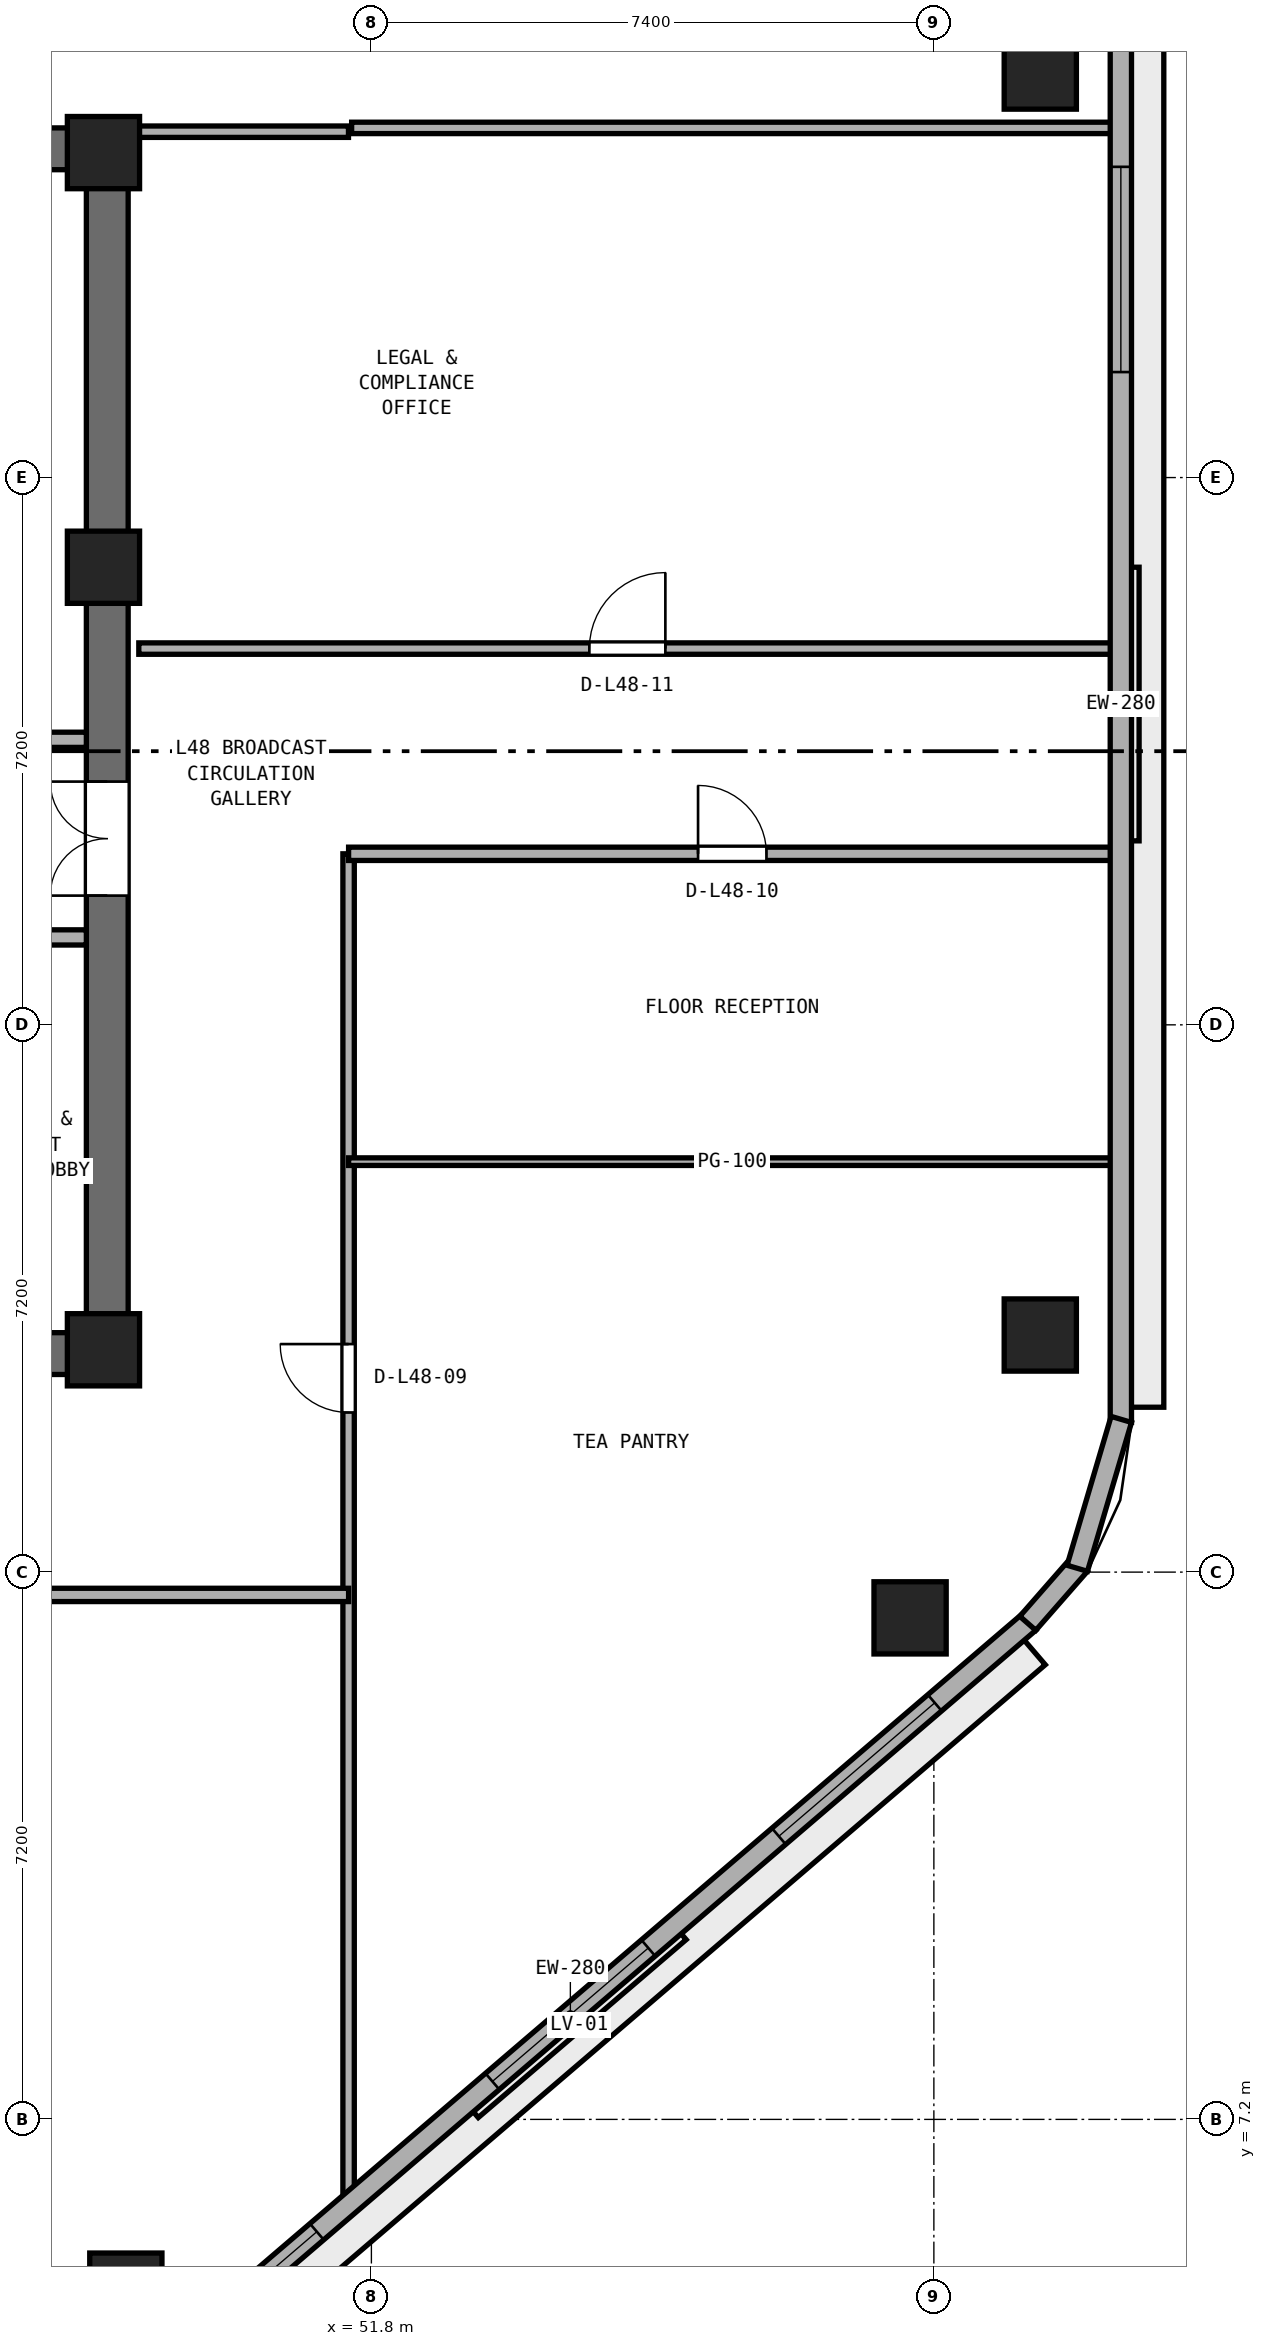
"""IFC4 building model, lengths in metres.
Left out: names, types, materials, properties, quantities, classifications, styles, units other than length and angle.
Written with IfcOpenShell. Run it as: python <this file> out.ifc"""

import sys

from ifc_helpers import new_model, si_unit, direction, frame, frame_2d, origin, origin_2d, place, context, subcontext, project, spatial, rectangle, extrude, element, fill, save


model = new_model("IFC4")
c1 = context("Model", 3, precision=1e-05, world=origin(), true_north=direction((0.0, 1.0)))
c2 = subcontext(c1, "Body", "Model", "MODEL_VIEW")
j1 = project(units=[si_unit("LENGTHUNIT", "METRE"), si_unit("PLANEANGLEUNIT", "RADIAN")], contexts=[c1])
p1 = place(None, origin())
s1 = spatial("IfcSite", under=j1, at=p1, CompositionType="ELEMENT")
p2 = place(p1, origin())
s2 = spatial("IfcBuilding", under=s1, at=p2, CompositionType="ELEMENT")
p3 = place(p2, frame((0.0, 0.0, 189.6)))
s3 = spatial("IfcBuildingStorey", under=s2, at=p3, CompositionType="ELEMENT", Elevation=189.6)
for number, where, z_axis, x_axis in (
    (1, (25.4, 17.275, 0.0), (0.0, 0.0, 1.0), (1.0, 0.0, 0.0)),
    (2, (25.4, 33.125, 0.0), (0.0, 0.0, 1.0), (1.0, 0.0, 0.0)),
):
    element("IfcWall", number, at=place(p3, frame(where, z_axis=z_axis, x_axis=x_axis)), inside=s3, PredefinedType="SHEAR", context=c2, shape_type="SweptSolid", body=[
        extrude(rectangle(XDim=23.2, YDim=0.55, at=frame_2d((11.6, 0.0))), origin(), (0.0, 0.0, 1.0), 3.54),
    ])
p4 = place(p3, frame((48.325, 17.55, 0.0), z_axis=(0.0, 0.0, 1.0), x_axis=(0.0, 1.0, 0.0)))
e3 = element("IfcWall", 3, at=p4, inside=s3, PredefinedType="SHEAR", context=c2, shape_type="SweptSolid", body=[
    extrude(rectangle(XDim=15.3, YDim=0.55, at=frame_2d((7.65, 0.0))), origin(), (0.0, 0.0, 1.0), 3.54),
])
p5 = place(p4, frame((5.75, 0.0, 0.0)))
e4 = element("IfcOpeningElement", 4, at=p5, cuts=e3, PredefinedType="OPENING", context=c2, shape_type="SweptSolid", body=[
    extrude(rectangle(XDim=1.5, YDim=2.15, at=frame_2d((0.75, 1.075))), frame((0.0, 0.285, 0.0), z_axis=(0.0, -1.0, 0.0), x_axis=(1.0, 0.0, 0.0)), (0.0, 0.0, 1.0), 0.57),
])
for number, where, z_axis, x_axis in (
    (5, (48.275, 17.325, 0.0), (0.0, 0.0, 1.0), (1.0, 0.0, 0.0)),
    (6, (48.275, 27.62, 0.0), (0.0, 0.0, 1.0), (1.0, 0.0, 0.0)),
    (7, (48.275, 33.075, 0.0), (0.0, 0.0, 1.0), (1.0, 0.0, 0.0)),
):
    element("IfcColumn", number, at=place(p3, frame(where, z_axis=z_axis, x_axis=x_axis)), inside=s3, PredefinedType="PILASTER", context=c2, shape_type="SweptSolid", body=[
        extrude(rectangle(XDim=0.95, YDim=0.95, at=origin_2d()), origin(), (0.0, 0.0, 1.0), 3.8),
    ])
for number, where, z_axis, x_axis in (
    (8, (48.57, 4.967, 0.0), (0.0, 0.0, 1.0), (1.0, 0.0, 0.0)),
    (9, (58.887, 13.798, 0.0), (0.0, 0.0, 1.0), (1.0, 0.0, 0.0)),
    (10, (60.6, 17.519, 0.0), (0.0, 0.0, 1.0), (1.0, 0.0, 0.0)),
    (11, (60.6, 34.122, 0.0), (0.0, 0.0, 1.0), (1.0, 0.0, 0.0)),
):
    element("IfcColumn", number, at=place(p3, frame(where, z_axis=z_axis, x_axis=x_axis)), inside=s3, PredefinedType="COLUMN", context=c2, shape_type="SweptSolid", body=[
        extrude(rectangle(XDim=0.95, YDim=0.95, at=origin_2d()), origin(), (0.0, 0.0, 1.0), 3.8),
    ])
p6 = place(p3, frame((42.0, 22.75, 0.0), z_axis=(0.0, 0.0, 1.0), x_axis=(1.0, 0.0, 0.0)))
e12 = element("IfcWall", 12, at=p6, inside=s3, PredefinedType="SOLIDWALL", context=c2, shape_type="SweptSolid", body=[
    extrude(rectangle(XDim=6.05, YDim=0.2, at=frame_2d((3.025, 0.0))), origin(), (0.0, 0.0, 1.0), 3.54),
])
p7 = place(p3, frame((46.1, 25.35, 0.0), z_axis=(0.0, 0.0, 1.0), x_axis=(1.0, 0.0, 0.0)))
e13 = element("IfcWall", 13, at=p7, inside=s3, PredefinedType="SOLIDWALL", context=c2, shape_type="SweptSolid", body=[
    extrude(rectangle(XDim=1.95, YDim=0.2, at=frame_2d((0.975, 0.0))), origin(), (0.0, 0.0, 1.0), 3.54),
])
p8 = place(p3, frame((51.5, 6.036, 0.0), z_axis=(0.0, 0.0, 1.0), x_axis=(0.0, 1.0, 0.0)))
e14 = element("IfcWall", 14, at=p8, inside=s3, PredefinedType="PARTITIONING", context=c2, shape_type="SweptSolid", body=[
    extrude(rectangle(XDim=17.814, YDim=0.15, at=frame_2d((8.907, 0.0))), origin(), (0.0, 0.0, 1.0), 3.54),
])
p9 = place(p8, frame((10.464, 0.0, 0.0)))
e15 = element("IfcOpeningElement", 15, at=p9, cuts=e14, PredefinedType="OPENING", context=c2, shape_type="SweptSolid", body=[
    extrude(rectangle(XDim=0.9, YDim=2.1, at=frame_2d((0.45, 1.05))), frame((0.0, 0.085, 0.0), z_axis=(0.0, -1.0, 0.0), x_axis=(1.0, 0.0, 0.0)), (0.0, 0.0, 1.0), 0.17),
])
p10 = place(p3, frame((22.5, 14.1, 0.0), z_axis=(0.0, 0.0, 1.0), x_axis=(1.0, 0.0, 0.0)))
e16 = element("IfcWall", 16, at=p10, inside=s3, PredefinedType="PARTITIONING", context=c2, shape_type="SweptSolid", body=[
    extrude(rectangle(XDim=29.0, YDim=0.175, at=frame_2d((14.5, 0.0))), origin(), (0.0, 0.0, 1.0), 3.54),
])
p11 = place(p10, frame((7.57, 0.0, 0.0)))
e17 = element("IfcOpeningElement", 17, at=p11, cuts=e16, PredefinedType="OPENING", context=c2, shape_type="SweptSolid", body=[
    extrude(rectangle(XDim=1.0, YDim=2.12, at=frame_2d((0.5, 1.06))), frame((0.0, 0.097, 0.0), z_axis=(0.0, -1.0, 0.0), x_axis=(1.0, 0.0, 0.0)), (0.0, 0.0, 1.0), 0.195),
])
p12 = place(p10, frame((21.88, 0.0, 0.0)))
e18 = element("IfcOpeningElement", 18, at=p12, cuts=e16, PredefinedType="OPENING", context=c2, shape_type="SweptSolid", body=[
    extrude(rectangle(XDim=0.9, YDim=2.1, at=frame_2d((0.45, 1.05))), frame((0.0, 0.097, 0.0), z_axis=(0.0, -1.0, 0.0), x_axis=(1.0, 0.0, 0.0)), (0.0, 0.0, 1.0), 0.195),
])
p13 = place(p3, frame((51.5, 19.8, 0.0), z_axis=(0.0, 0.0, 1.0), x_axis=(1.0, 0.0, 0.0)))
e19 = element("IfcWall", 19, at=p13, inside=s3, PredefinedType="PARTITIONING", context=c2, shape_type="SweptSolid", body=[
    extrude(rectangle(XDim=10.095, YDim=0.1, at=frame_2d((5.047, 0.0))), origin(), (0.0, 0.0, 1.0), 3.54),
])
p14 = place(p3, frame((51.5, 23.85, 0.0), z_axis=(0.0, 0.0, 1.0), x_axis=(1.0, 0.0, 0.0)))
e20 = element("IfcWall", 20, at=p14, inside=s3, PredefinedType="PARTITIONING", context=c2, shape_type="SweptSolid", body=[
    extrude(rectangle(XDim=10.095, YDim=0.175, at=frame_2d((5.047, 0.0))), origin(), (0.0, 0.0, 1.0), 3.54),
])
p15 = place(p14, frame((4.597, 0.0, 0.0)))
e21 = element("IfcOpeningElement", 21, at=p15, cuts=e20, PredefinedType="OPENING", context=c2, shape_type="SweptSolid", body=[
    extrude(rectangle(XDim=0.9, YDim=2.1, at=frame_2d((0.45, 1.05))), frame((0.0, 0.097, 0.0), z_axis=(0.0, -1.0, 0.0), x_axis=(1.0, 0.0, 0.0)), (0.0, 0.0, 1.0), 0.195),
])
p16 = place(p3, frame((48.74, 26.55, 0.0), z_axis=(0.0, 0.0, 1.0), x_axis=(1.0, 0.0, 0.0)))
e22 = element("IfcWall", 22, at=p16, inside=s3, PredefinedType="PARTITIONING", context=c2, shape_type="SweptSolid", body=[
    extrude(rectangle(XDim=12.855, YDim=0.15, at=frame_2d((6.427, 0.0))), origin(), (0.0, 0.0, 1.0), 3.54),
])
p17 = place(p16, frame((5.927, 0.0, 0.0)))
e23 = element("IfcOpeningElement", 23, at=p17, cuts=e22, PredefinedType="OPENING", context=c2, shape_type="SweptSolid", body=[
    extrude(rectangle(XDim=1.0, YDim=2.12, at=frame_2d((0.5, 1.06))), frame((0.0, 0.085, 0.0), z_axis=(0.0, -1.0, 0.0), x_axis=(1.0, 0.0, 0.0)), (0.0, 0.0, 1.0), 0.17),
])
p18 = place(p3, frame((48.74, 33.35, 0.0), z_axis=(0.0, 0.0, 1.0), x_axis=(1.0, 0.0, 0.0)))
e24 = element("IfcWall", 24, at=p18, inside=s3, PredefinedType="PARTITIONING", context=c2, shape_type="SweptSolid", body=[
    extrude(rectangle(XDim=2.759, YDim=0.15, at=frame_2d((1.379, 0.0))), origin(), (0.0, 0.0, 1.0), 2.923),
])
p19 = place(p3, frame((51.54, 33.4, 0.0), z_axis=(0.0, 0.0, 1.0), x_axis=(1.0, 0.0, 0.0)))
e25 = element("IfcWall", 25, at=p19, inside=s3, PredefinedType="PARTITIONING", context=c2, shape_type="SweptSolid", body=[
    extrude(rectangle(XDim=10.055, YDim=0.15, at=frame_2d((5.027, 0.0))), origin(), (0.0, 0.0, 1.0), 2.79),
])
p20 = place(p3, frame((48.385, 3.414, 0.0), z_axis=(0.0, 0.0, 1.0), x_axis=(0.759700260779, 0.650273414628, 0.0)))
e26 = element("IfcWall", 26, at=p20, inside=s3, PredefinedType="STANDARD", context=c2, shape_type="SweptSolid", body=[
    extrude(rectangle(XDim=15.881, YDim=0.28, at=frame_2d((7.94, 0.0))), origin(), (0.0, 0.0, 1.0), 3.54),
])
p21 = place(p20, frame((0.85, 0.0, 0.9)))
e27 = element("IfcOpeningElement", 27, at=p21, cuts=e26, PredefinedType="OPENING", context=c2, shape_type="SweptSolid", body=[
    extrude(rectangle(XDim=2.7, YDim=1.75, at=frame_2d((1.35, 0.875))), frame((0.0, 0.15, 0.0), z_axis=(0.0, -1.0, 0.0), x_axis=(1.0, 0.0, 0.0)), (0.0, 0.0, 1.0), 0.3),
])
p22 = place(p20, frame((6.59, 0.0, 0.9)))
e28 = element("IfcOpeningElement", 28, at=p22, cuts=e26, PredefinedType="OPENING", context=c2, shape_type="SweptSolid", body=[
    extrude(rectangle(XDim=2.7, YDim=1.75, at=frame_2d((1.35, 0.875))), frame((0.0, 0.15, 0.0), z_axis=(0.0, -1.0, 0.0), x_axis=(1.0, 0.0, 0.0)), (0.0, 0.0, 1.0), 0.3),
])
p23 = place(p20, frame((11.551, 0.0, 0.9)))
e29 = element("IfcOpeningElement", 29, at=p23, cuts=e26, PredefinedType="OPENING", context=c2, shape_type="SweptSolid", body=[
    extrude(rectangle(XDim=2.7, YDim=1.75, at=frame_2d((1.35, 0.875))), frame((0.0, 0.15, 0.0), z_axis=(0.0, -1.0, 0.0), x_axis=(1.0, 0.0, 0.0)), (0.0, 0.0, 1.0), 0.3),
])
p24 = place(p3, frame((61.66, 16.369, 0.0), z_axis=(0.0, 0.0, 1.0), x_axis=(0.0, 1.0, 0.0)))
e30 = element("IfcWall", 30, at=p24, inside=s3, PredefinedType="STANDARD", context=c2, shape_type="SweptSolid", body=[
    extrude(rectangle(XDim=18.902, YDim=0.28, at=frame_2d((9.451, 0.0))), origin(), (0.0, 0.0, 1.0), 3.54),
])
p25 = place(p24, frame((13.819, 0.0, 0.9)))
e31 = element("IfcOpeningElement", 31, at=p25, cuts=e30, PredefinedType="OPENING", context=c2, shape_type="SweptSolid", body=[
    extrude(rectangle(XDim=2.7, YDim=1.75, at=frame_2d((1.35, 0.875))), frame((0.0, 0.15, 0.0), z_axis=(0.0, -1.0, 0.0), x_axis=(1.0, 0.0, 0.0)), (0.0, 0.0, 1.0), 0.3),
])
p26 = place(p3, frame((60.436, 13.727, 0.0), z_axis=(0.0, 0.0, 1.0), x_axis=(0.658571618609, 0.752518055041, 0.0)))
e32 = element("IfcWall", 32, at=p26, inside=s3, PredefinedType="STANDARD", context=c2, shape_type="SweptSolid", body=[
    extrude(rectangle(XDim=1.032, YDim=0.28, at=frame_2d((0.516, 0.0))), origin(), (0.0, 0.0, 1.0), 3.54),
])
p27 = place(p3, frame((61.086, 14.45, 0.0), z_axis=(0.0, 0.0, 1.0), x_axis=(0.283660953453, 0.958924639107, 0.0)))
e33 = element("IfcWall", 33, at=p27, inside=s3, PredefinedType="STANDARD", context=c2, shape_type="SweptSolid", body=[
    extrude(rectangle(XDim=2.042, YDim=0.28, at=frame_2d((1.021, 0.0))), origin(), (0.0, 0.0, 1.0), 3.54),
])
p28 = place(p5, origin())
e34 = element("IfcDoor", 34, at=p28, inside=s3, OperationType="DOUBLE_DOOR_SINGLE_SWING", PredefinedType="DOOR", context=c2, shape_type="SweptSolid", body=[
    extrude(rectangle(XDim=1.5, YDim=2.15, at=frame_2d((0.75, 1.075))), frame((0.0, 0.025, 0.0), z_axis=(0.0, -1.0, 0.0), x_axis=(1.0, 0.0, 0.0)), (0.0, 0.0, 1.0), 0.05),
])
fill(e4, e34)
p29 = place(p9, origin())
e35 = element("IfcDoor", 35, at=p29, inside=s3, OperationType="SINGLE_SWING_RIGHT", PredefinedType="DOOR", context=c2, shape_type="SweptSolid", body=[
    extrude(rectangle(XDim=0.9, YDim=2.1, at=frame_2d((0.45, 1.05))), frame((0.0, 0.025, 0.0), z_axis=(0.0, -1.0, 0.0), x_axis=(1.0, 0.0, 0.0)), (0.0, 0.0, 1.0), 0.05),
])
fill(e15, e35)
p30 = place(p15, origin())
e36 = element("IfcDoor", 36, at=p30, inside=s3, OperationType="SINGLE_SWING_LEFT", PredefinedType="DOOR", context=c2, shape_type="SweptSolid", body=[
    extrude(rectangle(XDim=0.9, YDim=2.1, at=frame_2d((0.45, 1.05))), frame((0.0, 0.025, 0.0), z_axis=(0.0, -1.0, 0.0), x_axis=(1.0, 0.0, 0.0)), (0.0, 0.0, 1.0), 0.05),
])
fill(e21, e36)
p31 = place(p17, origin())
e37 = element("IfcDoor", 37, at=p31, inside=s3, OperationType="SINGLE_SWING_RIGHT", PredefinedType="DOOR", context=c2, shape_type="SweptSolid", body=[
    extrude(rectangle(XDim=1.0, YDim=2.12, at=frame_2d((0.5, 1.06))), frame((0.0, 0.025, 0.0), z_axis=(0.0, -1.0, 0.0), x_axis=(1.0, 0.0, 0.0)), (0.0, 0.0, 1.0), 0.05),
])
fill(e23, e37)
p32 = place(p21, origin())
e38 = element("IfcWindow", 38, at=p32, inside=s3, PartitioningType="SINGLE_PANEL", PredefinedType="WINDOW", context=c2, shape_type="SweptSolid", body=[
    extrude(rectangle(XDim=2.7, YDim=1.75, at=frame_2d((1.35, 0.875))), frame((0.0, 0.03, 0.0), z_axis=(0.0, -1.0, 0.0), x_axis=(1.0, 0.0, 0.0)), (0.0, 0.0, 1.0), 0.06),
])
fill(e27, e38)
p33 = place(p22, origin())
e39 = element("IfcWindow", 39, at=p33, inside=s3, PartitioningType="SINGLE_PANEL", PredefinedType="WINDOW", context=c2, shape_type="SweptSolid", body=[
    extrude(rectangle(XDim=2.7, YDim=1.75, at=frame_2d((1.35, 0.875))), frame((0.0, 0.03, 0.0), z_axis=(0.0, -1.0, 0.0), x_axis=(1.0, 0.0, 0.0)), (0.0, 0.0, 1.0), 0.06),
])
fill(e28, e39)
p34 = place(p23, origin())
e40 = element("IfcWindow", 40, at=p34, inside=s3, PartitioningType="SINGLE_PANEL", PredefinedType="WINDOW", context=c2, shape_type="SweptSolid", body=[
    extrude(rectangle(XDim=2.7, YDim=1.75, at=frame_2d((1.35, 0.875))), frame((0.0, 0.03, 0.0), z_axis=(0.0, -1.0, 0.0), x_axis=(1.0, 0.0, 0.0)), (0.0, 0.0, 1.0), 0.06),
])
fill(e29, e40)
p35 = place(p25, origin())
e41 = element("IfcWindow", 41, at=p35, inside=s3, PartitioningType="SINGLE_PANEL", PredefinedType="WINDOW", context=c2, shape_type="SweptSolid", body=[
    extrude(rectangle(XDim=2.7, YDim=1.75, at=frame_2d((1.35, 0.875))), frame((0.0, 0.03, 0.0), z_axis=(0.0, -1.0, 0.0), x_axis=(1.0, 0.0, 0.0)), (0.0, 0.0, 1.0), 0.06),
])
fill(e31, e41)
save(model, sys.argv[1])
